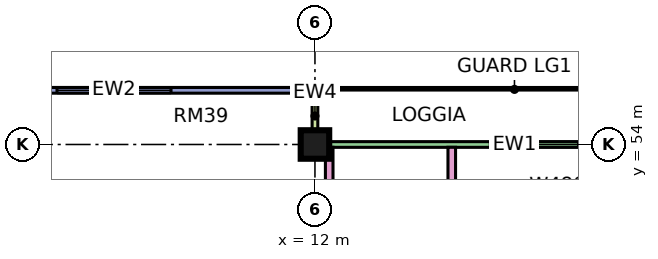
"""IFC4 building model, lengths in metres.
Left out: names, types, materials, properties, quantities, classifications, styles, units other than length and angle.
Written with IfcOpenShell. Run it as: python <this file> out.ifc"""

import sys

from ifc_helpers import new_model, si_unit, direction, frame, frame_2d, origin, origin_2d, place, context, subcontext, project, spatial, rectangle, extrude, element, fill, save


model = new_model("IFC4")
c1 = context("Model", 3, precision=1e-05, world=origin(), true_north=direction((0.0, 1.0)))
c2 = subcontext(c1, "Body", "Model", "MODEL_VIEW")
j1 = project(units=[si_unit("LENGTHUNIT", "METRE"), si_unit("PLANEANGLEUNIT", "RADIAN")], contexts=[c1])
p1 = place(None, origin())
s1 = spatial("IfcSite", under=j1, at=p1, CompositionType="ELEMENT")
p2 = place(p1, origin())
s2 = spatial("IfcBuilding", under=s1, at=p2, CompositionType="ELEMENT")
p3 = place(p2, frame((0.0, 0.0, 376.4)))
s3 = spatial("IfcBuildingStorey", under=s2, at=p3, CompositionType="ELEMENT", Elevation=376.4)
p4 = place(p3, frame((12.0, 54.0, 0.0), z_axis=(0.0, 0.0, 1.0), x_axis=(1.0, 0.0, 0.0)))
e1 = element("IfcColumn", 1, at=p4, inside=s3, PredefinedType="COLUMN", context=c2, shape_type="SweptSolid", body=[
    extrude(rectangle(XDim=0.75, YDim=0.75, at=origin_2d()), origin(), (0.0, 0.0, 1.0), 3.75),
])
p5 = place(p3, frame((22.425, 54.0, 0.0), z_axis=(0.0, 0.0, 1.0), x_axis=(-1.0, 0.0, 0.0)))
e2 = element("IfcWall", 2, at=p5, inside=s3, PredefinedType="SOLIDWALL", context=c2, shape_type="SweptSolid", body=[
    extrude(rectangle(XDim=10.35, YDim=0.15, at=frame_2d((5.175, 0.0))), origin(), (0.0, 0.0, 1.0), 3.35),
])
p6 = place(p5, frame((1.012, 0.0, 0.45)))
e3 = element("IfcOpeningElement", 3, at=p6, cuts=e2, PredefinedType="OPENING", context=c2, shape_type="SweptSolid", body=[
    extrude(rectangle(XDim=4.8, YDim=2.4, at=frame_2d((2.4, 1.2))), frame((0.0, 0.085, 0.0), z_axis=(0.0, -1.0, 0.0), x_axis=(1.0, 0.0, 0.0)), (0.0, 0.0, 1.0), 0.17),
])
p7 = place(p3, frame((12.0, 55.5, 0.0), z_axis=(0.0, 0.0, 1.0), x_axis=(0.0, -1.0, 0.0)))
e4 = element("IfcWall", 4, at=p7, inside=s3, PredefinedType="SOLIDWALL", context=c2, shape_type="SweptSolid", body=[
    extrude(rectangle(XDim=1.5, YDim=0.15, at=frame_2d((0.75, 0.0))), origin(), (0.0, 0.0, 1.0), 3.35),
])
p8 = place(p3, frame((11.925, 55.425, 0.0), z_axis=(0.0, 0.0, 1.0), x_axis=(-1.0, 0.0, 0.0)))
e5 = element("IfcWall", 5, at=p8, inside=s3, PredefinedType="SOLIDWALL", context=c2, shape_type="SweptSolid", body=[
    extrude(rectangle(XDim=10.425, YDim=0.15, at=frame_2d((5.212, 0.0))), origin(), (0.0, 0.0, 1.0), 3.35),
])
p9 = place(p8, frame((3.712, 0.0, 0.45)))
e6 = element("IfcOpeningElement", 6, at=p9, cuts=e5, PredefinedType="OPENING", context=c2, shape_type="SweptSolid", body=[
    extrude(rectangle(XDim=3.0, YDim=2.4, at=frame_2d((1.5, 1.2))), frame((0.0, 0.085, 0.0), z_axis=(0.0, -1.0, 0.0), x_axis=(1.0, 0.0, 0.0)), (0.0, 0.0, 1.0), 0.17),
])
p10 = place(p3, frame((12.375, 20.0, 0.0), z_axis=(0.0, 0.0, 1.0), x_axis=(0.0, 1.0, 0.0)))
e7 = element("IfcWall", 7, at=p10, inside=s3, PredefinedType="PARTITIONING", context=c2, shape_type="SweptSolid", body=[
    extrude(rectangle(XDim=33.926, YDim=0.2, at=frame_2d((16.963, 0.0))), origin(), (0.0, 0.0, 1.0), 3.35),
])
p11 = place(p10, frame((27.6, 0.0, 0.0)))
e8 = element("IfcOpeningElement", 8, at=p11, cuts=e7, PredefinedType="OPENING", context=c2, shape_type="SweptSolid", body=[
    extrude(rectangle(XDim=1.0, YDim=2.1, at=frame_2d((0.5, 1.05))), frame((0.0, 0.11, 0.0), z_axis=(0.0, -1.0, 0.0), x_axis=(1.0, 0.0, 0.0)), (0.0, 0.0, 1.0), 0.22),
])
p12 = place(p10, frame((0.6, 0.0, 0.0)))
e9 = element("IfcOpeningElement", 9, at=p12, cuts=e7, PredefinedType="OPENING", context=c2, shape_type="SweptSolid", body=[
    extrude(rectangle(XDim=1.2, YDim=2.1, at=frame_2d((0.6, 1.05))), frame((0.0, 0.11, 0.0), z_axis=(0.0, -1.0, 0.0), x_axis=(1.0, 0.0, 0.0)), (0.0, 0.0, 1.0), 0.22),
])
p13 = place(p10, frame((14.1, 0.0, 0.0)))
e10 = element("IfcOpeningElement", 10, at=p13, cuts=e7, PredefinedType="OPENING", context=c2, shape_type="SweptSolid", body=[
    extrude(rectangle(XDim=1.0, YDim=2.1, at=frame_2d((0.5, 1.05))), frame((0.0, 0.11, 0.0), z_axis=(0.0, -1.0, 0.0), x_axis=(1.0, 0.0, 0.0)), (0.0, 0.0, 1.0), 0.22),
])
p14 = place(p3, frame((15.6, 51.225, 0.0), z_axis=(0.0, 0.0, 1.0), x_axis=(0.0, 1.0, 0.0)))
e11 = element("IfcWall", 11, at=p14, inside=s3, PredefinedType="PARTITIONING", context=c2, shape_type="SweptSolid", body=[
    extrude(rectangle(XDim=2.701, YDim=0.2, at=frame_2d((1.351, 0.0))), origin(), (0.0, 0.0, 1.0), 3.35),
])
p15 = place(p6, origin())
e12 = element("IfcWindow", 12, at=p15, inside=s3, PartitioningType="SINGLE_PANEL", PredefinedType="WINDOW", context=c2, shape_type="SweptSolid", body=[
    extrude(rectangle(XDim=4.8, YDim=2.4, at=frame_2d((2.4, 1.2))), frame((0.0, 0.03, 0.0), z_axis=(0.0, -1.0, 0.0), x_axis=(1.0, 0.0, 0.0)), (0.0, 0.0, 1.0), 0.06),
])
fill(e3, e12)
p16 = place(p9, origin())
e13 = element("IfcWindow", 13, at=p16, inside=s3, PartitioningType="SINGLE_PANEL", PredefinedType="WINDOW", context=c2, shape_type="SweptSolid", body=[
    extrude(rectangle(XDim=3.0, YDim=2.4, at=frame_2d((1.5, 1.2))), frame((0.0, 0.03, 0.0), z_axis=(0.0, -1.0, 0.0), x_axis=(1.0, 0.0, 0.0)), (0.0, 0.0, 1.0), 0.06),
])
fill(e6, e13)
save(model, sys.argv[1])
